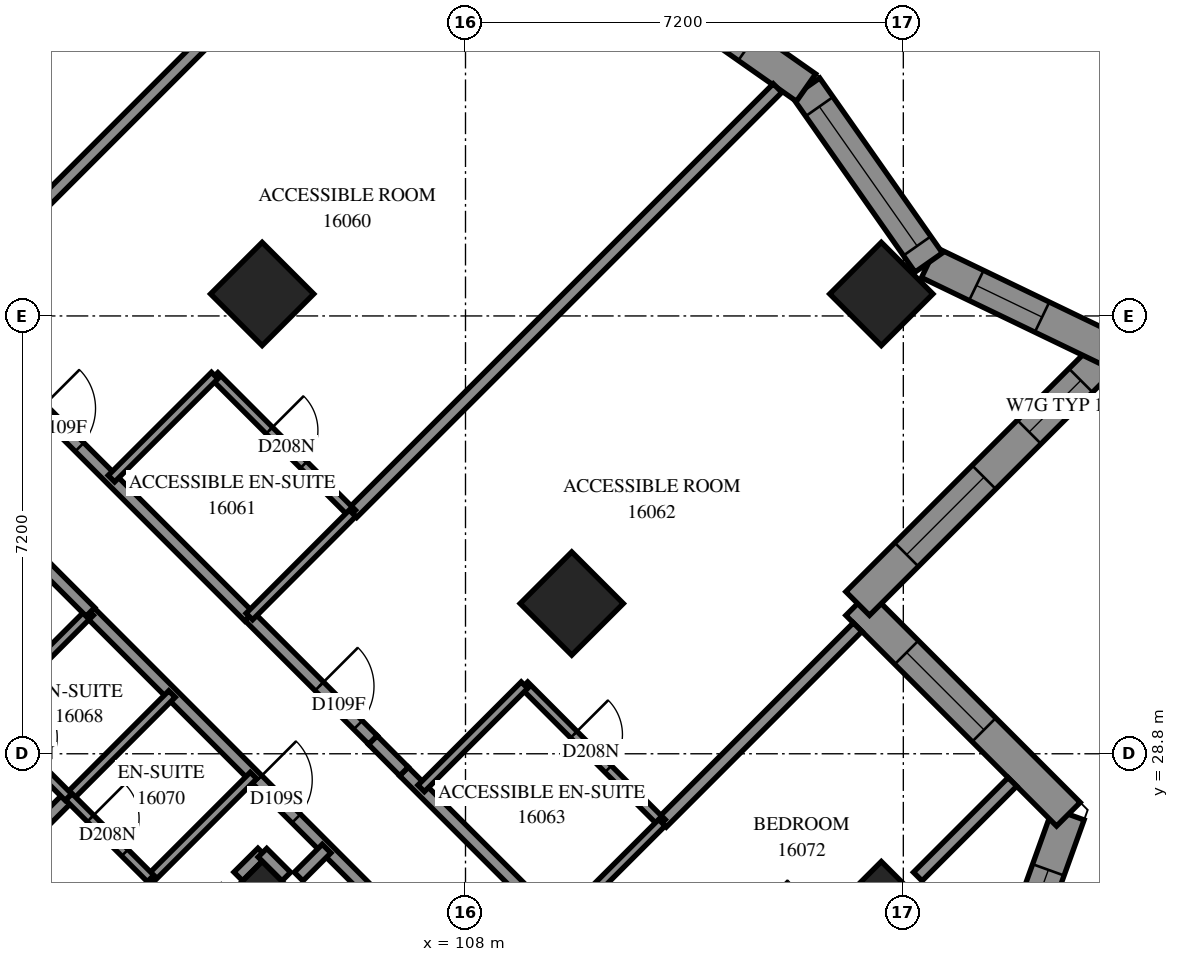
"""IFC4 building model, lengths in metres.
Left out: names, types, materials, properties, quantities, classifications, styles, units other than length and angle.
Written with IfcOpenShell. Run it as: python <this file> out.ifc"""

import sys

from ifc_helpers import new_model, si_unit, direction, frame, frame_2d, origin, origin_2d, place, context, subcontext, project, spatial, polyline, rectangle, outline, extrude, element, fill, save


model = new_model("IFC4")
c1 = context("Model", 3, precision=1e-05, world=origin(), true_north=direction((0.0, 1.0)))
c2 = subcontext(c1, "Body", "Model", "MODEL_VIEW")
j1 = project(units=[si_unit("LENGTHUNIT", "METRE"), si_unit("PLANEANGLEUNIT", "RADIAN")], contexts=[c1])
p1 = place(None, origin())
s1 = spatial("IfcSite", under=j1, at=p1, CompositionType="ELEMENT")
p2 = place(p1, origin())
s2 = spatial("IfcBuilding", under=s1, at=p2, CompositionType="ELEMENT")
p3 = place(p2, frame((0.0, 0.0, 61.0)))
s3 = spatial("IfcBuildingStorey", under=s2, at=p3, CompositionType="ELEMENT", Elevation=61.0)
for number, where, z_axis, x_axis in (
    (1, (104.656, 36.362, 0.0), (0.0, 0.0, 1.0), (0.707, -0.707, 0.0)),
    (2, (114.838, 36.362, 0.0), (0.0, 0.0, 1.0), (0.707, -0.707, 0.0)),
    (3, (109.747, 31.271, 0.0), (0.0, 0.0, 1.0), (0.707, -0.707, 0.0)),
    (4, (104.656, 26.18, 0.0), (0.0, 0.0, 1.0), (0.707, -0.707, 0.0)),
    (5, (114.838, 26.18, 0.0), (0.0, 0.0, 1.0), (0.707, -0.707, 0.0)),
):
    element("IfcColumn", number, at=place(p3, frame(where, z_axis=z_axis, x_axis=x_axis)), inside=s3, PredefinedType="COLUMN", context=c2, shape_type="SweptSolid", body=[
        extrude(rectangle(XDim=1.2, YDim=1.2, at=origin_2d()), origin(), (0.0, 0.0, 1.0), 3.1),
    ])
p4 = place(p3, frame((116.106, 22.782, 0.0), z_axis=(0.0, 0.0, 1.0), x_axis=(0.3387725306, 0.9408683077, 0.0)))
e6 = element("IfcWall", 6, at=p4, inside=s3, PredefinedType="SOLIDWALL", context=c2, shape_type="SweptSolid", body=[
    extrude(outline(polyline([(-0.124, -0.275), (5.513, -0.275), (5.164, 0.275), (0.124, 0.275), (-0.124, -0.275)])), origin(), (0.0, 0.0, 1.0), 3.1),
])
p5 = place(p4, frame((0.847, 0.0, 0.5)))
e7 = element("IfcOpeningElement", 7, at=p5, cuts=e6, PredefinedType="OPENING", context=c2, shape_type="SweptSolid", body=[
    extrude(rectangle(XDim=1.2, YDim=2.45, at=frame_2d((0.6, 1.225))), frame((0.0, 0.285, 0.0), z_axis=(0.0, -1.0, 0.0), x_axis=(1.0, 0.0, 0.0)), (0.0, 0.0, 1.0), 0.57),
])
p6 = place(p4, frame((3.167, 0.0, 0.5)))
e8 = element("IfcOpeningElement", 8, at=p6, cuts=e6, PredefinedType="OPENING", context=c2, shape_type="SweptSolid", body=[
    extrude(rectangle(XDim=1.2, YDim=2.45, at=frame_2d((0.6, 1.225))), frame((0.0, 0.285, 0.0), z_axis=(0.0, -1.0, 0.0), x_axis=(1.0, 0.0, 0.0)), (0.0, 0.0, 1.0), 0.57),
])
p7 = place(p3, frame((117.914, 27.805, 0.0), z_axis=(0.0, 0.0, 1.0), x_axis=(-0.7071067812, 0.7071067812, 0.0)))
e9 = element("IfcWall", 9, at=p7, inside=s3, PredefinedType="SOLIDWALL", context=c2, shape_type="SweptSolid", body=[
    extrude(outline(polyline([(-0.174, -0.275), (4.625, -0.275), (5.175, 0.275), (0.174, 0.275), (-0.174, -0.275)])), origin(), (0.0, 0.0, 1.0), 3.1),
])
p8 = place(p7, frame((1.963, 0.0, 0.6)))
e10 = element("IfcOpeningElement", 10, at=p8, cuts=e9, PredefinedType="OPENING", context=c2, shape_type="SweptSolid", body=[
    extrude(rectangle(XDim=1.8, YDim=1.9, at=frame_2d((0.9, 0.95))), frame((0.0, 0.285, 0.0), z_axis=(0.0, -1.0, 0.0), x_axis=(1.0, 0.0, 0.0)), (0.0, 0.0, 1.0), 0.57),
])
p9 = place(p3, frame((114.449, 31.271, 0.0), z_axis=(0.0, 0.0, 1.0), x_axis=(0.7070982928, 0.7071152695, 0.0)))
e11 = element("IfcWall", 11, at=p9, inside=s3, PredefinedType="SOLIDWALL", context=c2, shape_type="SweptSolid", body=[
    extrude(outline(polyline([(0.275, -0.275), (6.278, -0.275), (5.503, 0.275), (-0.275, 0.275), (0.275, -0.275)])), origin(), (0.0, 0.0, 1.0), 3.1),
])
p10 = place(p9, frame((1.137, 0.0, 0.6)))
e12 = element("IfcOpeningElement", 12, at=p10, cuts=e11, PredefinedType="OPENING", context=c2, shape_type="SweptSolid", body=[
    extrude(rectangle(XDim=1.8, YDim=1.9, at=frame_2d((0.9, 0.95))), frame((0.0, 0.285, 0.0), z_axis=(0.0, -1.0, 0.0), x_axis=(1.0, 0.0, 0.0)), (0.0, 0.0, 1.0), 0.57),
])
p11 = place(p9, frame((3.989, 0.0, 0.6)))
e13 = element("IfcOpeningElement", 13, at=p11, cuts=e11, PredefinedType="OPENING", context=c2, shape_type="SweptSolid", body=[
    extrude(rectangle(XDim=1.2, YDim=1.9, at=frame_2d((0.6, 0.95))), frame((0.0, 0.285, 0.0), z_axis=(0.0, -1.0, 0.0), x_axis=(1.0, 0.0, 0.0)), (0.0, 0.0, 1.0), 0.57),
])
p12 = place(p3, frame((118.614, 35.436, 0.0), z_axis=(0.0, 0.0, 1.0), x_axis=(-0.9009968815, 0.4338255634, 0.0)))
e14 = element("IfcWall", 14, at=p12, inside=s3, PredefinedType="SOLIDWALL", context=c2, shape_type="SweptSolid", body=[
    extrude(outline(polyline([(-0.388, -0.275), (3.254, -0.275), (3.397, 0.275), (0.388, 0.275), (-0.388, -0.275)])), origin(), (0.0, 0.0, 1.0), 3.1),
])
p13 = place(p12, frame((1.257, 0.0, 0.5)))
e15 = element("IfcOpeningElement", 15, at=p13, cuts=e14, PredefinedType="OPENING", context=c2, shape_type="SweptSolid", body=[
    extrude(rectangle(XDim=1.2, YDim=2.45, at=frame_2d((0.6, 1.225))), frame((0.0, 0.285, 0.0), z_axis=(0.0, -1.0, 0.0), x_axis=(1.0, 0.0, 0.0)), (0.0, 0.0, 1.0), 0.57),
])
p14 = place(p3, frame((115.618, 36.879, 0.0), z_axis=(0.0, 0.0, 1.0), x_axis=(-0.5742892267, 0.8186524807, 0.0)))
e16 = element("IfcWall", 16, at=p14, inside=s3, PredefinedType="SOLIDWALL", context=c2, shape_type="SweptSolid", body=[
    extrude(outline(polyline([(0.072, -0.275), (3.561, -0.275), (3.465, 0.275), (-0.072, 0.275), (0.072, -0.275)])), origin(), (0.0, 0.0, 1.0), 3.1),
])
p15 = place(p14, frame((0.333, 0.0, 0.5)))
e17 = element("IfcOpeningElement", 17, at=p15, cuts=e16, PredefinedType="OPENING", context=c2, shape_type="SweptSolid", body=[
    extrude(rectangle(XDim=2.8, YDim=2.45, at=frame_2d((1.4, 1.225))), frame((0.0, 0.285, 0.0), z_axis=(0.0, -1.0, 0.0), x_axis=(1.0, 0.0, 0.0)), (0.0, 0.0, 1.0), 0.57),
])
p16 = place(p3, frame((113.6, 39.755, 0.0), z_axis=(0.0, 0.0, 1.0), x_axis=(-0.8186472188, 0.5742967275, 0.0)))
e18 = element("IfcWall", 18, at=p16, inside=s3, PredefinedType="SOLIDWALL", context=c2, shape_type="SweptSolid", body=[
    extrude(outline(polyline([(-0.048, -0.275), (3.442, -0.275), (3.538, 0.275), (0.048, 0.275), (-0.048, -0.275)])), origin(), (0.0, 0.0, 1.0), 3.1),
])
p17 = place(p16, frame((1.169, 0.0, 0.5)))
e19 = element("IfcOpeningElement", 19, at=p17, cuts=e18, PredefinedType="OPENING", context=c2, shape_type="SweptSolid", body=[
    extrude(rectangle(XDim=1.2, YDim=2.45, at=frame_2d((0.6, 1.225))), frame((0.0, 0.285, 0.0), z_axis=(0.0, -1.0, 0.0), x_axis=(1.0, 0.0, 0.0)), (0.0, 0.0, 1.0), 0.57),
])
p18 = place(p3, frame((101.825, 31.125, 0.0), z_axis=(0.0, 0.0, 1.0), x_axis=(0.7071067812, -0.7071067812, 0.0)))
e20 = element("IfcWall", 20, at=p18, inside=s3, PredefinedType="PARTITIONING", context=c2, shape_type="SweptSolid", body=[
    extrude(rectangle(XDim=12.7, YDim=0.2, at=frame_2d((6.35, 0.0))), origin(), (0.0, 0.0, 1.0), 3.1),
])
p19 = place(p18, frame((3.895, 0.0, 0.0)))
e21 = element("IfcOpeningElement", 21, at=p19, cuts=e20, PredefinedType="OPENING", context=c2, shape_type="SweptSolid", body=[
    extrude(rectangle(XDim=0.9, YDim=2.1, at=frame_2d((0.45, 1.05))), frame((0.0, 0.11, 0.0), z_axis=(0.0, -1.0, 0.0), x_axis=(1.0, 0.0, 0.0)), (0.0, 0.0, 1.0), 0.22),
])
p20 = place(p18, frame((9.056, 0.0, 0.0)))
e22 = element("IfcOpeningElement", 22, at=p20, cuts=e20, PredefinedType="OPENING", context=c2, shape_type="SweptSolid", body=[
    extrude(rectangle(XDim=1.0, YDim=2.1, at=frame_2d((0.5, 1.05))), frame((0.0, 0.11, 0.0), z_axis=(0.0, -1.0, 0.0), x_axis=(1.0, 0.0, 0.0)), (0.0, 0.0, 1.0), 0.22),
])
p21 = place(p3, frame((106.14, 32.756, 0.0), z_axis=(0.0, 0.0, 1.0), x_axis=(0.7071017243, 0.707111838, 0.0)))
e23 = element("IfcWall", 23, at=p21, inside=s3, PredefinedType="PARTITIONING", context=c2, shape_type="SweptSolid", body=[
    extrude(rectangle(XDim=9.887, YDim=0.2, at=frame_2d((4.944, 0.0))), origin(), (0.0, 0.0, 1.0), 3.1),
])
p22 = place(p3, frame((101.049, 37.847, 0.0), z_axis=(0.0, 0.0, 1.0), x_axis=(0.7071067812, 0.7071067812, 0.0)))
e24 = element("IfcWall", 24, at=p22, inside=s3, PredefinedType="PARTITIONING", context=c2, shape_type="SweptSolid", body=[
    extrude(rectangle(XDim=9.831, YDim=0.2, at=frame_2d((4.915, 0.0))), origin(), (0.0, 0.0, 1.0), 3.1),
])
p23 = place(p3, frame((99.349, 36.147, 0.0), z_axis=(0.0, 0.0, 1.0), x_axis=(0.7071067812, -0.7071067812, 0.0)))
e25 = element("IfcWall", 25, at=p23, inside=s3, PredefinedType="PARTITIONING", context=c2, shape_type="SweptSolid", body=[
    extrude(rectangle(XDim=7.201, YDim=0.2, at=frame_2d((3.601, 0.0))), origin(), (0.0, 0.0, 1.0), 3.1),
])
p24 = place(p23, frame((2.358, 0.0, 0.0)))
e26 = element("IfcOpeningElement", 26, at=p24, cuts=e25, PredefinedType="OPENING", context=c2, shape_type="SweptSolid", body=[
    extrude(rectangle(XDim=0.9, YDim=2.1, at=frame_2d((0.45, 1.05))), frame((0.0, 0.11, 0.0), z_axis=(0.0, -1.0, 0.0), x_axis=(1.0, 0.0, 0.0)), (0.0, 0.0, 1.0), 0.22),
])
p25 = place(p3, frame((106.987, 28.509, 0.0), z_axis=(0.0, 0.0, 1.0), x_axis=(0.7071067812, -0.7071067812, 0.0)))
e27 = element("IfcWall", 27, at=p25, inside=s3, PredefinedType="PARTITIONING", context=c2, shape_type="SweptSolid", body=[
    extrude(rectangle(XDim=7.198, YDim=0.2, at=frame_2d((3.599, 0.0))), origin(), (0.0, 0.0, 1.0), 3.1),
])
p26 = place(p25, frame((4.004, 0.0, 0.0)))
e28 = element("IfcOpeningElement", 28, at=p26, cuts=e27, PredefinedType="OPENING", context=c2, shape_type="SweptSolid", body=[
    extrude(rectangle(XDim=0.9, YDim=2.1, at=frame_2d((0.45, 1.05))), frame((0.0, 0.11, 0.0), z_axis=(0.0, -1.0, 0.0), x_axis=(1.0, 0.0, 0.0)), (0.0, 0.0, 1.0), 0.22),
])
p27 = place(p3, frame((96.519, 23.136, 0.0), z_axis=(0.0, 0.0, 1.0), x_axis=(0.7071067812, 0.7071067812, 0.0)))
e29 = element("IfcWall", 29, at=p27, inside=s3, PredefinedType="PARTITIONING", context=c2, shape_type="SweptSolid", body=[
    extrude(rectangle(XDim=7.005, YDim=0.2, at=frame_2d((3.503, 0.0))), origin(), (0.0, 0.0, 1.0), 3.1),
])
p28 = place(p3, frame((111.231, 27.665, 0.0), z_axis=(0.0, 0.0, 1.0), x_axis=(0.7071067812, 0.7071067812, 0.0)))
e30 = element("IfcWall", 30, at=p28, inside=s3, PredefinedType="PARTITIONING", context=c2, shape_type="SweptSolid", body=[
    extrude(rectangle(XDim=4.55, YDim=0.2, at=frame_2d((2.275, 0.0))), origin(), (0.0, 0.0, 1.0), 3.1),
])
p29 = place(p3, frame((108.97, 29.928, 0.0), z_axis=(0.0, 0.0, 1.0), x_axis=(0.7067942478, -0.7074191764, 0.0)))
e31 = element("IfcWall", 31, at=p29, inside=s3, PredefinedType="PARTITIONING", context=c2, shape_type="SweptSolid", body=[
    extrude(rectangle(XDim=3.2, YDim=0.15, at=frame_2d((1.6, 0.0))), origin(), (0.0, 0.0, 1.0), 3.1),
])
p30 = place(p29, frame((1.148, 0.0, 0.0)))
e32 = element("IfcOpeningElement", 32, at=p30, cuts=e31, PredefinedType="OPENING", context=c2, shape_type="SweptSolid", body=[
    extrude(rectangle(XDim=0.8, YDim=2.1, at=frame_2d((0.4, 1.05))), frame((0.0, 0.085, 0.0), z_axis=(0.0, -1.0, 0.0), x_axis=(1.0, 0.0, 0.0)), (0.0, 0.0, 1.0), 0.17),
])
p31 = place(p3, frame((103.875, 35.015, 0.0), z_axis=(0.0, 0.0, 1.0), x_axis=(0.7071067812, -0.7071067812, 0.0)))
e33 = element("IfcWall", 33, at=p31, inside=s3, PredefinedType="PARTITIONING", context=c2, shape_type="SweptSolid", body=[
    extrude(rectangle(XDim=3.199, YDim=0.15, at=frame_2d((1.599, 0.0))), origin(), (0.0, 0.0, 1.0), 3.1),
])
p32 = place(p31, frame((1.27, 0.0, 0.0)))
e34 = element("IfcOpeningElement", 34, at=p32, cuts=e33, PredefinedType="OPENING", context=c2, shape_type="SweptSolid", body=[
    extrude(rectangle(XDim=0.8, YDim=2.1, at=frame_2d((0.4, 1.05))), frame((0.0, 0.085, 0.0), z_axis=(0.0, -1.0, 0.0), x_axis=(1.0, 0.0, 0.0)), (0.0, 0.0, 1.0), 0.17),
])
p33 = place(p3, frame((104.445, 31.059, 0.0), z_axis=(0.0, 0.0, 1.0), x_axis=(0.7074545101, -0.7067588812, 0.0)))
e35 = element("IfcWall", 35, at=p33, inside=s3, PredefinedType="PARTITIONING", context=c2, shape_type="SweptSolid", body=[
    extrude(rectangle(XDim=2.875, YDim=0.2, at=frame_2d((1.438, 0.0))), origin(), (0.0, 0.0, 1.0), 3.1),
])
p34 = place(p33, frame((1.626, 0.0, 0.0)))
e36 = element("IfcOpeningElement", 36, at=p34, cuts=e35, PredefinedType="OPENING", context=c2, shape_type="SweptSolid", body=[
    extrude(rectangle(XDim=0.9, YDim=2.1, at=frame_2d((0.45, 1.05))), frame((0.0, 0.11, 0.0), z_axis=(0.0, -1.0, 0.0), x_axis=(1.0, 0.0, 0.0)), (0.0, 0.0, 1.0), 0.22),
])
for number, where, z_axis, x_axis in (
    (37, (107.271, 28.231, 0.0), (0.0, 0.0, 1.0), (0.707, 0.707, 0.0)),
    (38, (100.129, 29.433, 0.0), (0.0, 0.0, 1.0), (0.707, 0.707, 0.0)),
):
    element("IfcWall", number, at=place(p3, frame(where, z_axis=z_axis, x_axis=x_axis)), inside=s3, PredefinedType="PARTITIONING", context=c2, shape_type="SweptSolid", body=[
        extrude(rectangle(XDim=2.401, YDim=0.15, at=frame_2d((1.201, 0.0))), origin(), (0.0, 0.0, 1.0), 3.1),
    ])
for number, where, z_axis, x_axis in (
    (39, (104.445, 31.057, 0.0), (0.0, 0.0, 1.0), (0.707, 0.708, 0.0)),
    (40, (101.477, 28.085, 0.0), (0.0, 0.0, 1.0), (0.707, 0.708, 0.0)),
    (41, (102.177, 33.325, 0.0), (0.0, 0.0, 1.0), (0.708, 0.707, 0.0)),
    (42, (109.531, 25.971, 0.0), (0.0, 0.0, 1.0), (0.708, 0.707, 0.0)),
):
    element("IfcWall", number, at=place(p3, frame(where, z_axis=z_axis, x_axis=x_axis)), inside=s3, PredefinedType="PARTITIONING", context=c2, shape_type="SweptSolid", body=[
        extrude(rectangle(XDim=2.4, YDim=0.15, at=frame_2d((1.2, 0.0))), origin(), (0.0, 0.0, 1.0), 3.1),
    ])
p35 = place(p3, frame((102.817, 26.747, 0.0), z_axis=(0.0, 0.0, 1.0), x_axis=(0.7071067812, 0.7071067812, 0.0)))
e43 = element("IfcWall", 43, at=p35, inside=s3, PredefinedType="PARTITIONING", context=c2, shape_type="SweptSolid", body=[
    extrude(rectangle(XDim=2.398, YDim=0.15, at=frame_2d((1.199, 0.0))), origin(), (0.0, 0.0, 1.0), 3.1),
])
p36 = place(p3, frame((115.438, 26.78, 0.0), z_axis=(0.0, 0.0, 1.0), x_axis=(0.7071067812, 0.7071067812, 0.0)))
e44 = element("IfcWall", 44, at=p36, inside=s3, PredefinedType="PARTITIONING", context=c2, shape_type="SweptSolid", body=[
    extrude(rectangle(XDim=2.201, YDim=0.2, at=frame_2d((1.101, 0.0))), origin(), (0.0, 0.0, 1.0), 3.1),
])
p37 = place(p3, frame((100.127, 29.429, 0.0), z_axis=(0.0, 0.0, 1.0), x_axis=(0.7071067812, -0.7071067812, 0.0)))
e45 = element("IfcWall", 45, at=p37, inside=s3, PredefinedType="PARTITIONING", context=c2, shape_type="SweptSolid", body=[
    extrude(rectangle(XDim=1.901, YDim=0.15, at=frame_2d((0.95, 0.0))), origin(), (0.0, 0.0, 1.0), 3.1),
])
p38 = place(p37, frame((0.508, 0.0, 0.0)))
e46 = element("IfcOpeningElement", 46, at=p38, cuts=e45, PredefinedType="OPENING", context=c2, shape_type="SweptSolid", body=[
    extrude(rectangle(XDim=0.8, YDim=2.1, at=frame_2d((0.4, 1.05))), frame((0.0, 0.085, 0.0), z_axis=(0.0, -1.0, 0.0), x_axis=(1.0, 0.0, 0.0)), (0.0, 0.0, 1.0), 0.17),
])
p39 = place(p3, frame((101.477, 28.091, 0.0), z_axis=(0.0, 0.0, 1.0), x_axis=(0.7076330979, -0.7065800724, 0.0)))
e47 = element("IfcWall", 47, at=p39, inside=s3, PredefinedType="PARTITIONING", context=c2, shape_type="SweptSolid", body=[
    extrude(rectangle(XDim=1.899, YDim=0.15, at=frame_2d((0.95, 0.0))), origin(), (0.0, 0.0, 1.0), 3.1),
])
p40 = place(p39, frame((0.501, 0.0, 0.0)))
e48 = element("IfcOpeningElement", 48, at=p40, cuts=e47, PredefinedType="OPENING", context=c2, shape_type="SweptSolid", body=[
    extrude(rectangle(XDim=0.8, YDim=2.1, at=frame_2d((0.4, 1.05))), frame((0.0, 0.085, 0.0), z_axis=(0.0, -1.0, 0.0), x_axis=(1.0, 0.0, 0.0)), (0.0, 0.0, 1.0), 0.17),
])
p41 = place(p3, frame((100.629, 32.335, 0.0), z_axis=(0.0, 0.0, 1.0), x_axis=(0.7071067812, -0.7071067812, 0.0)))
e49 = element("IfcWall", 49, at=p41, inside=s3, PredefinedType="PARTITIONING", context=c2, shape_type="SweptSolid", body=[
    extrude(rectangle(XDim=1.7, YDim=0.2, at=frame_2d((0.85, 0.0))), origin(), (0.0, 0.0, 1.0), 3.1),
])
p42 = place(p3, frame((106.476, 29.024, 0.0), z_axis=(0.0, 0.0, 1.0), x_axis=(0.7057270646, -0.7084838109, 0.0)))
e50 = element("IfcWall", 50, at=p42, inside=s3, PredefinedType="PARTITIONING", context=c2, shape_type="SweptSolid", body=[
    extrude(rectangle(XDim=0.726, YDim=0.2, at=frame_2d((0.363, 0.0))), origin(), (0.0, 0.0, 1.0), 3.1),
])
p43 = place(p3, frame((105.255, 26.781, 0.0), z_axis=(0.0, 0.0, 1.0), x_axis=(0.7071067812, 0.7071067812, 0.0)))
e51 = element("IfcWall", 51, at=p43, inside=s3, PredefinedType="PARTITIONING", context=c2, shape_type="SweptSolid", body=[
    extrude(rectangle(XDim=0.65, YDim=0.2, at=frame_2d((0.325, 0.0))), origin(), (0.0, 0.0, 1.0), 3.1),
])
p44 = place(p3, frame((104.263, 26.784, 0.0), z_axis=(0.0, 0.0, 1.0), x_axis=(0.7089037401, 0.705305244, 0.0)))
e52 = element("IfcWall", 52, at=p44, inside=s3, PredefinedType="PARTITIONING", context=c2, shape_type="SweptSolid", body=[
    extrude(rectangle(XDim=0.556, YDim=0.2, at=frame_2d((0.278, 0.0))), origin(), (0.0, 0.0, 1.0), 3.1),
])
p45 = place(p3, frame((104.66, 27.172, 0.0), z_axis=(0.0, 0.0, 1.0), x_axis=(0.7071067812, -0.7071067812, 0.0)))
e53 = element("IfcWall", 53, at=p45, inside=s3, PredefinedType="PARTITIONING", context=c2, shape_type="SweptSolid", body=[
    extrude(rectangle(XDim=0.554, YDim=0.2, at=frame_2d((0.277, 0.0))), origin(), (0.0, 0.0, 1.0), 3.1),
])
p46 = place(p6, origin())
e54 = element("IfcWindow", 54, at=p46, inside=s3, PartitioningType="SINGLE_PANEL", PredefinedType="WINDOW", context=c2, shape_type="SweptSolid", body=[
    extrude(rectangle(XDim=1.2, YDim=2.45, at=frame_2d((0.6, 1.225))), frame((0.0, 0.155, 0.0), z_axis=(0.0, -1.0, 0.0), x_axis=(1.0, 0.0, 0.0)), (0.0, 0.0, 1.0), 0.06),
])
fill(e8, e54)
p47 = place(p8, origin())
e55 = element("IfcWindow", 55, at=p47, inside=s3, PartitioningType="SINGLE_PANEL", PredefinedType="WINDOW", context=c2, shape_type="SweptSolid", body=[
    extrude(rectangle(XDim=1.8, YDim=1.9, at=frame_2d((0.9, 0.95))), frame((0.0, 0.155, 0.0), z_axis=(0.0, -1.0, 0.0), x_axis=(1.0, 0.0, 0.0)), (0.0, 0.0, 1.0), 0.06),
])
fill(e10, e55)
p48 = place(p10, origin())
e56 = element("IfcWindow", 56, at=p48, inside=s3, PartitioningType="SINGLE_PANEL", PredefinedType="WINDOW", context=c2, shape_type="SweptSolid", body=[
    extrude(rectangle(XDim=1.8, YDim=1.9, at=frame_2d((0.9, 0.95))), frame((0.0, 0.155, 0.0), z_axis=(0.0, -1.0, 0.0), x_axis=(1.0, 0.0, 0.0)), (0.0, 0.0, 1.0), 0.06),
])
fill(e12, e56)
p49 = place(p11, origin())
e57 = element("IfcWindow", 57, at=p49, inside=s3, PartitioningType="SINGLE_PANEL", PredefinedType="WINDOW", context=c2, shape_type="SweptSolid", body=[
    extrude(rectangle(XDim=1.2, YDim=1.9, at=frame_2d((0.6, 0.95))), frame((0.0, 0.155, 0.0), z_axis=(0.0, -1.0, 0.0), x_axis=(1.0, 0.0, 0.0)), (0.0, 0.0, 1.0), 0.06),
])
fill(e13, e57)
p50 = place(p13, origin())
e58 = element("IfcWindow", 58, at=p50, inside=s3, PartitioningType="SINGLE_PANEL", PredefinedType="WINDOW", context=c2, shape_type="SweptSolid", body=[
    extrude(rectangle(XDim=1.2, YDim=2.45, at=frame_2d((0.6, 1.225))), frame((0.0, 0.155, 0.0), z_axis=(0.0, -1.0, 0.0), x_axis=(1.0, 0.0, 0.0)), (0.0, 0.0, 1.0), 0.06),
])
fill(e15, e58)
p51 = place(p15, origin())
e59 = element("IfcWindow", 59, at=p51, inside=s3, PartitioningType="SINGLE_PANEL", PredefinedType="WINDOW", context=c2, shape_type="SweptSolid", body=[
    extrude(rectangle(XDim=2.8, YDim=2.45, at=frame_2d((1.4, 1.225))), frame((0.0, 0.155, 0.0), z_axis=(0.0, -1.0, 0.0), x_axis=(1.0, 0.0, 0.0)), (0.0, 0.0, 1.0), 0.06),
])
fill(e17, e59)
p52 = place(p17, origin())
e60 = element("IfcWindow", 60, at=p52, inside=s3, PartitioningType="SINGLE_PANEL", PredefinedType="WINDOW", context=c2, shape_type="SweptSolid", body=[
    extrude(rectangle(XDim=1.2, YDim=2.45, at=frame_2d((0.6, 1.225))), frame((0.0, 0.155, 0.0), z_axis=(0.0, -1.0, 0.0), x_axis=(1.0, 0.0, 0.0)), (0.0, 0.0, 1.0), 0.06),
])
fill(e19, e60)
p53 = place(p24, origin())
e61 = element("IfcDoor", 61, at=p53, inside=s3, OperationType="SINGLE_SWING_RIGHT", PredefinedType="DOOR", context=c2, shape_type="SweptSolid", body=[
    extrude(rectangle(XDim=0.9, YDim=2.1, at=frame_2d((0.45, 1.05))), frame((0.0, 0.025, 0.0), z_axis=(0.0, -1.0, 0.0), x_axis=(1.0, 0.0, 0.0)), (0.0, 0.0, 1.0), 0.05),
])
fill(e26, e61)
p54 = place(p32, origin())
e62 = element("IfcDoor", 62, at=p54, inside=s3, OperationType="SINGLE_SWING_RIGHT", PredefinedType="DOOR", context=c2, shape_type="SweptSolid", body=[
    extrude(rectangle(XDim=0.8, YDim=2.1, at=frame_2d((0.4, 1.05))), frame((0.0, 0.025, 0.0), z_axis=(0.0, -1.0, 0.0), x_axis=(1.0, 0.0, 0.0)), (0.0, 0.0, 1.0), 0.05),
])
fill(e34, e62)
p55 = place(p34, origin())
e63 = element("IfcDoor", 63, at=p55, inside=s3, OperationType="SINGLE_SWING_RIGHT", PredefinedType="DOOR", context=c2, shape_type="SweptSolid", body=[
    extrude(rectangle(XDim=0.9, YDim=2.1, at=frame_2d((0.45, 1.05))), frame((0.0, 0.025, 0.0), z_axis=(0.0, -1.0, 0.0), x_axis=(1.0, 0.0, 0.0)), (0.0, 0.0, 1.0), 0.05),
])
fill(e36, e63)
p56 = place(p30, origin())
e64 = element("IfcDoor", 64, at=p56, inside=s3, OperationType="SINGLE_SWING_RIGHT", PredefinedType="DOOR", context=c2, shape_type="SweptSolid", body=[
    extrude(rectangle(XDim=0.8, YDim=2.1, at=frame_2d((0.4, 1.05))), frame((0.0, 0.025, 0.0), z_axis=(0.0, -1.0, 0.0), x_axis=(1.0, 0.0, 0.0)), (0.0, 0.0, 1.0), 0.05),
])
fill(e32, e64)
p57 = place(p19, origin())
e65 = element("IfcDoor", 65, at=p57, inside=s3, OperationType="SINGLE_SWING_LEFT", PredefinedType="DOOR", context=c2, shape_type="SweptSolid", body=[
    extrude(rectangle(XDim=0.9, YDim=2.1, at=frame_2d((0.45, 1.05))), frame((0.0, 0.025, 0.0), z_axis=(0.0, -1.0, 0.0), x_axis=(1.0, 0.0, 0.0)), (0.0, 0.0, 1.0), 0.05),
])
fill(e21, e65)
p58 = place(p40, origin())
e66 = element("IfcDoor", 66, at=p58, inside=s3, OperationType="SINGLE_SWING_RIGHT", PredefinedType="DOOR", context=c2, shape_type="SweptSolid", body=[
    extrude(rectangle(XDim=0.8, YDim=2.1, at=frame_2d((0.4, 1.05))), frame((0.0, 0.025, 0.0), z_axis=(0.0, -1.0, 0.0), x_axis=(1.0, 0.0, 0.0)), (0.0, 0.0, 1.0), 0.05),
])
fill(e48, e66)
save(model, sys.argv[1])
